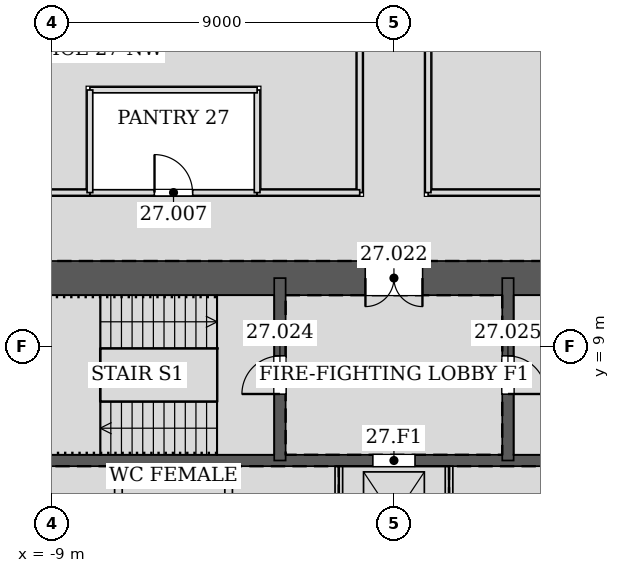
"""IFC4 building model, lengths in metres.
Left out: names, types, materials, properties, quantities, classifications, styles, units other than length and angle.
Written with IfcOpenShell. Run it as: python <this file> out.ifc"""

import sys

from ifc_helpers import new_model, si_unit, direction, frame, frame_2d, origin, place, context, subcontext, project, spatial, rectangle, extrude, element, fill, save


model = new_model("IFC4")
c1 = context("Model", 3, precision=1e-05, world=origin(), true_north=direction((0.0, 1.0)))
c2 = subcontext(c1, "Body", "Model", "MODEL_VIEW")
j1 = project(units=[si_unit("LENGTHUNIT", "METRE"), si_unit("PLANEANGLEUNIT", "RADIAN")], contexts=[c1])
p1 = place(None, origin())
s1 = spatial("IfcSite", under=j1, at=p1, CompositionType="ELEMENT")
p2 = place(p1, origin())
s2 = spatial("IfcBuilding", under=s1, at=p2, CompositionType="ELEMENT")
p3 = place(p2, frame((0.0, 0.0, 121.8)))
s3 = spatial("IfcBuildingStorey", under=s2, at=p3, CompositionType="ELEMENT", Elevation=121.8)
p4 = place(p3, frame((10.8, 10.8, 0.0), z_axis=(0.0, 0.0, 1.0), x_axis=(-1.0, 0.0, 0.0)))
e1 = element("IfcWall", 1, at=p4, inside=s3, PredefinedType="SOLIDWALL", context=c2, shape_type="SweptSolid", body=[
    extrude(rectangle(XDim=21.6, YDim=0.9, at=frame_2d((10.8, 0.0))), origin(), (0.0, 0.0, 1.0), 4.2),
])
p5 = place(p4, frame((10.05, 0.0, 0.0)))
e2 = element("IfcOpeningElement", 2, at=p5, cuts=e1, PredefinedType="OPENING", context=c2, shape_type="SweptSolid", body=[
    extrude(rectangle(XDim=1.5, YDim=2.1, at=frame_2d((0.75, 1.05))), frame((0.0, 0.46, 0.0), z_axis=(0.0, -1.0, 0.0), x_axis=(1.0, 0.0, 0.0)), (0.0, 0.0, 1.0), 0.92),
])
p6 = place(p3, frame((-10.8, 6.0, 0.0), z_axis=(0.0, 0.0, 1.0), x_axis=(1.0, 0.0, 0.0)))
e3 = element("IfcWall", 3, at=p6, inside=s3, PredefinedType="SOLIDWALL", context=c2, shape_type="SweptSolid", body=[
    extrude(rectangle(XDim=21.6, YDim=0.3, at=frame_2d((10.8, 0.0))), origin(), (0.0, 0.0, 1.0), 4.2),
])
p7 = place(p6, frame((10.25, 0.0, 0.0)))
e4 = element("IfcOpeningElement", 4, at=p7, cuts=e3, PredefinedType="OPENING", context=c2, shape_type="SweptSolid", body=[
    extrude(rectangle(XDim=1.1, YDim=2.1, at=frame_2d((0.55, 1.05))), frame((0.0, 0.16, 0.0), z_axis=(0.0, -1.0, 0.0), x_axis=(1.0, 0.0, 0.0)), (0.0, 0.0, 1.0), 0.32),
])
p8 = place(p3, frame((-3.0, 6.0, 0.0), z_axis=(0.0, 0.0, 1.0), x_axis=(0.0, 1.0, 0.0)))
e5 = element("IfcWall", 5, at=p8, inside=s3, PredefinedType="SOLIDWALL", context=c2, shape_type="SweptSolid", body=[
    extrude(rectangle(XDim=4.8, YDim=0.3, at=frame_2d((2.4, 0.0))), origin(), (0.0, 0.0, 1.0), 4.2),
])
p9 = place(p8, frame((1.75, 0.0, 0.0)))
e6 = element("IfcOpeningElement", 6, at=p9, cuts=e5, PredefinedType="OPENING", context=c2, shape_type="SweptSolid", body=[
    extrude(rectangle(XDim=1.0, YDim=2.1, at=frame_2d((0.5, 1.05))), frame((0.0, 0.16, 0.0), z_axis=(0.0, -1.0, 0.0), x_axis=(1.0, 0.0, 0.0)), (0.0, 0.0, 1.0), 0.32),
])
p10 = place(p3, frame((3.0, 6.0, 0.0), z_axis=(0.0, 0.0, 1.0), x_axis=(0.0, 1.0, 0.0)))
e7 = element("IfcWall", 7, at=p10, inside=s3, PredefinedType="SOLIDWALL", context=c2, shape_type="SweptSolid", body=[
    extrude(rectangle(XDim=4.8, YDim=0.3, at=frame_2d((2.4, 0.0))), origin(), (0.0, 0.0, 1.0), 4.2),
])
p11 = place(p10, frame((1.75, 0.0, 0.0)))
e8 = element("IfcOpeningElement", 8, at=p11, cuts=e7, PredefinedType="OPENING", context=c2, shape_type="SweptSolid", body=[
    extrude(rectangle(XDim=1.0, YDim=2.1, at=frame_2d((0.5, 1.05))), frame((0.0, 0.16, 0.0), z_axis=(0.0, -1.0, 0.0), x_axis=(1.0, 0.0, 0.0)), (0.0, 0.0, 1.0), 0.32),
])
p12 = place(p3, frame((-3.599, 13.05, 0.0), z_axis=(0.0, 0.0, 1.0), x_axis=(-1.0, 0.0, 0.0)))
e9 = element("IfcWall", 9, at=p12, inside=s3, PredefinedType="PARTITIONING", context=c2, shape_type="SweptSolid", body=[
    extrude(rectangle(XDim=4.402, YDim=0.15, at=frame_2d((2.201, 0.0))), origin(), (0.0, 0.0, 1.0), 4.035),
])
p13 = place(p12, frame((1.701, 0.0, 0.0)))
e10 = element("IfcOpeningElement", 10, at=p13, cuts=e9, PredefinedType="OPENING", context=c2, shape_type="SweptSolid", body=[
    extrude(rectangle(XDim=1.0, YDim=2.1, at=frame_2d((0.5, 1.05))), frame((0.0, 0.085, 0.0), z_axis=(0.0, -1.0, 0.0), x_axis=(1.0, 0.0, 0.0)), (0.0, 0.0, 1.0), 0.17),
])
p14 = place(p3, frame((13.05, 13.05, 0.0), z_axis=(0.0, 0.0, 1.0), x_axis=(-1.0, 0.0, 0.0)))
e11 = element("IfcWall", 11, at=p14, inside=s3, PredefinedType="PARTITIONING", context=c2, shape_type="SweptSolid", body=[
    extrude(rectangle(XDim=12.15, YDim=0.15, at=frame_2d((6.075, 0.0))), origin(), (0.0, 0.0, 1.0), 3.042),
])
p15 = place(p14, frame((5.175, 0.0, 0.0)))
e12 = element("IfcOpeningElement", 12, at=p15, cuts=e11, PredefinedType="OPENING", context=c2, shape_type="SweptSolid", body=[
    extrude(rectangle(XDim=1.8, YDim=2.4, at=frame_2d((0.9, 1.2))), frame((0.0, 0.085, 0.0), z_axis=(0.0, -1.0, 0.0), x_axis=(1.0, 0.0, 0.0)), (0.0, 0.0, 1.0), 0.17),
])
p16 = place(p3, frame((0.9, 13.05, 0.0), z_axis=(0.0, 0.0, 1.0), x_axis=(0.0, 1.0, 0.0)))
e13 = element("IfcWall", 13, at=p16, inside=s3, PredefinedType="PARTITIONING", context=c2, shape_type="SweptSolid", body=[
    extrude(rectangle(XDim=5.57, YDim=0.15, at=frame_2d((2.785, 0.0))), origin(), (0.0, 0.0, 1.0), 3.426),
])
p17 = place(p3, frame((-7.999, 13.05, 0.0), z_axis=(0.0, 0.0, 1.0), x_axis=(-1.0, 0.0, 0.0)))
e14 = element("IfcWall", 14, at=p17, inside=s3, PredefinedType="PARTITIONING", context=c2, shape_type="SweptSolid", body=[
    extrude(rectangle(XDim=5.051, YDim=0.15, at=frame_2d((2.525, 0.0))), origin(), (0.0, 0.0, 1.0), 3.042),
])
p18 = place(p3, frame((-0.9, 19.62, 0.0), z_axis=(0.0, 0.0, 1.0), x_axis=(0.0, -1.0, 0.0)))
e15 = element("IfcWall", 15, at=p18, inside=s3, PredefinedType="PARTITIONING", context=c2, shape_type="SweptSolid", body=[
    extrude(rectangle(XDim=6.57, YDim=0.15, at=frame_2d((3.285, 0.0))), origin(), (0.0, 0.0, 1.0), 3.426),
])
p19 = place(p3, frame((-0.9, 13.05, 0.0), z_axis=(0.0, 0.0, 1.0), x_axis=(-1.0, 0.0, 0.0)))
e16 = element("IfcWall", 16, at=p19, inside=s3, PredefinedType="PARTITIONING", context=c2, shape_type="SweptSolid", body=[
    extrude(rectangle(XDim=2.701, YDim=0.15, at=frame_2d((1.351, 0.0))), origin(), (0.0, 0.0, 1.0), 4.035),
])
p20 = place(p3, frame((-3.6, 13.05, 0.0), z_axis=(0.0, 0.0, 1.0), x_axis=(0.0, 1.0, 0.0)))
e17 = element("IfcWall", 17, at=p20, inside=s3, PredefinedType="PARTITIONING", context=c2, shape_type="SweptSolid", body=[
    extrude(rectangle(XDim=2.7, YDim=0.15, at=frame_2d((1.35, 0.0))), origin(), (0.0, 0.0, 1.0), 3.426),
])
p21 = place(p3, frame((-3.6, 15.75, 0.0), z_axis=(0.0, 0.0, 1.0), x_axis=(-1.0, 0.0, 0.0)))
e18 = element("IfcWall", 18, at=p21, inside=s3, PredefinedType="PARTITIONING", context=c2, shape_type="SweptSolid", body=[
    extrude(rectangle(XDim=4.4, YDim=0.15, at=frame_2d((2.2, 0.0))), origin(), (0.0, 0.0, 1.0), 4.035),
])
p22 = place(p3, frame((-8.0, 15.75, 0.0), z_axis=(0.0, 0.0, 1.0), x_axis=(0.0, -1.0, 0.0)))
e19 = element("IfcWall", 19, at=p22, inside=s3, PredefinedType="PARTITIONING", context=c2, shape_type="SweptSolid", body=[
    extrude(rectangle(XDim=2.7, YDim=0.15, at=frame_2d((1.35, 0.0))), origin(), (0.0, 0.0, 1.0), 3.426),
])
for number, where, z_axis, x_axis in (
    (20, (-7.25, 3.15, 0.0), (0.0, 0.0, 1.0), (0.0, 1.0, 0.0)),
    (21, (-4.35, 3.15, 0.0), (0.0, 0.0, 1.0), (0.0, 1.0, 0.0)),
    (22, (-1.45, 3.15, 0.0), (0.0, 0.0, 1.0), (0.0, 1.0, 0.0)),
    (23, (1.45, 3.15, 0.0), (0.0, 0.0, 1.0), (0.0, 1.0, 0.0)),
):
    element("IfcWall", number, at=place(p3, frame(where, z_axis=z_axis, x_axis=x_axis)), inside=s3, PredefinedType="PARTITIONING", context=c2, shape_type="SweptSolid", body=[
        extrude(rectangle(XDim=2.7, YDim=0.2, at=frame_2d((1.35, 0.0))), origin(), (0.0, 0.0, 1.0), 4.035),
    ])
p23 = place(p13, frame((1.0, 0.0, 0.0), z_axis=(0.0, 0.0, 1.0), x_axis=(-1.0, 0.0, 0.0)))
e24 = element("IfcDoor", 24, at=p23, inside=s3, OperationType="SINGLE_SWING_LEFT", PredefinedType="DOOR", context=c2, shape_type="SweptSolid", body=[
    extrude(rectangle(XDim=1.0, YDim=2.1, at=frame_2d((0.5, 1.05))), frame((0.0, 0.025, 0.0), z_axis=(0.0, -1.0, 0.0), x_axis=(1.0, 0.0, 0.0)), (0.0, 0.0, 1.0), 0.05),
])
fill(e10, e24)
p24 = place(p5, origin())
e25 = element("IfcDoor", 25, at=p24, inside=s3, OperationType="DOUBLE_DOOR_SINGLE_SWING", PredefinedType="DOOR", context=c2, shape_type="SweptSolid", body=[
    extrude(rectangle(XDim=1.5, YDim=2.1, at=frame_2d((0.75, 1.05))), frame((0.0, 0.025, 0.0), z_axis=(0.0, -1.0, 0.0), x_axis=(1.0, 0.0, 0.0)), (0.0, 0.0, 1.0), 0.05),
])
fill(e2, e25)
p25 = place(p9, origin())
e26 = element("IfcDoor", 26, at=p25, inside=s3, OperationType="SINGLE_SWING_LEFT", PredefinedType="DOOR", context=c2, shape_type="SweptSolid", body=[
    extrude(rectangle(XDim=1.0, YDim=2.1, at=frame_2d((0.5, 1.05))), frame((0.0, 0.025, 0.0), z_axis=(0.0, -1.0, 0.0), x_axis=(1.0, 0.0, 0.0)), (0.0, 0.0, 1.0), 0.05),
])
fill(e6, e26)
p26 = place(p11, frame((1.0, 0.0, 0.0), z_axis=(0.0, 0.0, 1.0), x_axis=(-1.0, 0.0, 0.0)))
e27 = element("IfcDoor", 27, at=p26, inside=s3, OperationType="SINGLE_SWING_RIGHT", PredefinedType="DOOR", context=c2, shape_type="SweptSolid", body=[
    extrude(rectangle(XDim=1.0, YDim=2.1, at=frame_2d((0.5, 1.05))), frame((0.0, 0.025, 0.0), z_axis=(0.0, -1.0, 0.0), x_axis=(1.0, 0.0, 0.0)), (0.0, 0.0, 1.0), 0.05),
])
fill(e8, e27)
p27 = place(p7, origin())
e28 = element("IfcDoor", 28, at=p27, inside=s3, OperationType="DOUBLE_DOOR_SLIDING", PredefinedType="DOOR", context=c2, shape_type="SweptSolid", body=[
    extrude(rectangle(XDim=1.1, YDim=2.1, at=frame_2d((0.55, 1.05))), frame((0.0, 0.025, 0.0), z_axis=(0.0, -1.0, 0.0), x_axis=(1.0, 0.0, 0.0)), (0.0, 0.0, 1.0), 0.05),
])
fill(e4, e28)
save(model, sys.argv[1])
